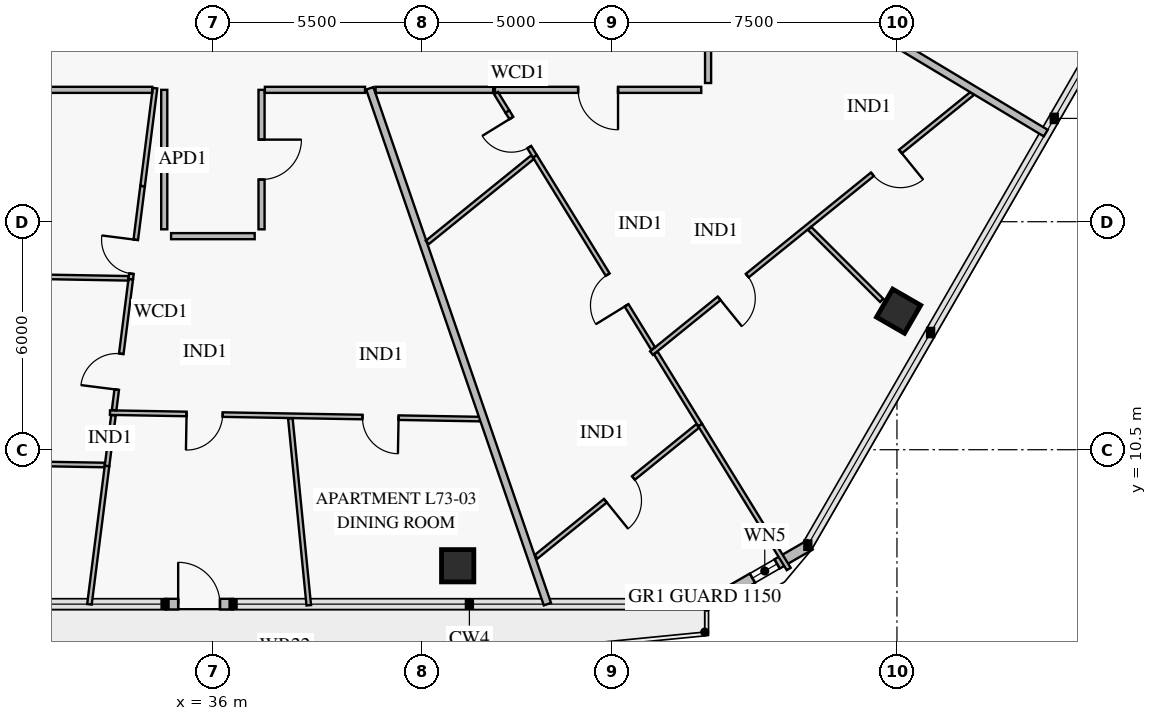
"""IFC4 building model, lengths in metres.
Left out: names, types, materials, properties, quantities, classifications, styles, units other than length and angle.
Written with IfcOpenShell. Run it as: python <this file> out.ifc"""

import sys

from ifc_helpers import new_model, si_unit, direction, frame, frame_2d, origin, origin_2d, place, context, subcontext, project, spatial, rectangle, extrude, element, fill, save


model = new_model("IFC4")
c1 = context("Model", 3, precision=1e-05, world=origin(), true_north=direction((0.0, 1.0)))
c2 = subcontext(c1, "Body", "Model", "MODEL_VIEW")
j1 = project(units=[si_unit("LENGTHUNIT", "METRE"), si_unit("PLANEANGLEUNIT", "RADIAN")], contexts=[c1])
p1 = place(None, origin())
s1 = spatial("IfcSite", under=j1, at=p1, CompositionType="ELEMENT")
p2 = place(p1, origin())
s2 = spatial("IfcBuilding", under=s1, at=p2, CompositionType="ELEMENT")
p3 = place(p2, frame((0.0, 0.0, 288.2)))
s3 = spatial("IfcBuildingStorey", under=s2, at=p3, CompositionType="ELEMENT", Elevation=288.2)
for number, where, z_axis, x_axis in (
    (1, (42.441, 7.446, 0.0), (0.0, 0.0, 1.0), (1.0, 0.0, 0.0)),
    (2, (54.044, 14.145, 0.0), (0.0, 0.0, 1.0), (0.5, 0.866, 0.0)),
):
    element("IfcColumn", number, at=place(p3, frame(where, z_axis=z_axis, x_axis=x_axis)), inside=s3, PredefinedType="COLUMN", context=c2, shape_type="SweptSolid", body=[
        extrude(rectangle(XDim=0.85, YDim=0.85, at=origin_2d()), origin(), (0.0, 0.0, 1.0), 3.55),
    ])
p4 = place(p3, frame((51.715, 7.996, 0.0), z_axis=(0.0, 0.0, 1.0), x_axis=(-0.866028773314, -0.499994163758, 0.0)))
e3 = element("IfcWall", 3, at=p4, inside=s3, PredefinedType="SOLIDWALL", context=c2, shape_type="SweptSolid", body=[
    extrude(rectangle(XDim=3.215, YDim=0.28, at=frame_2d((1.607, 0.0))), origin(), (0.0, 0.0, 1.0), 3.55),
])
p5 = place(p4, frame((1.003, 0.0, 0.85)))
e4 = element("IfcOpeningElement", 4, at=p5, cuts=e3, PredefinedType="OPENING", context=c2, shape_type="SweptSolid", body=[
    extrude(rectangle(XDim=0.75, YDim=1.5, at=frame_2d((0.375, 0.75))), frame((0.0, 0.152, 0.0), z_axis=(0.0, -1.0, 0.0), x_axis=(1.0, 0.0, 0.0)), (0.0, 0.0, 1.0), 0.304),
])
p6 = place(p3, frame((36.531, 6.436, 0.0), z_axis=(0.0, 0.0, 1.0), x_axis=(-1.0, 0.0, 0.0)))
e5 = element("IfcWall", 5, at=p6, inside=s3, PredefinedType="SOLIDWALL", context=c2, shape_type="SweptSolid", body=[
    extrude(rectangle(XDim=1.79, YDim=0.28, at=frame_2d((0.895, 0.0))), origin(), (0.0, 0.0, 1.0), 3.55),
])
p7 = place(p6, frame((0.345, 0.0, 0.0)))
e6 = element("IfcOpeningElement", 6, at=p7, cuts=e5, PredefinedType="OPENING", context=c2, shape_type="SweptSolid", body=[
    extrude(rectangle(XDim=1.1, YDim=2.2, at=frame_2d((0.55, 1.1))), frame((0.0, 0.152, 0.0), z_axis=(0.0, -1.0, 0.0), x_axis=(1.0, 0.0, 0.0)), (0.0, 0.0, 1.0), 0.304),
])
p8 = place(p3, frame((33.292, 11.476, 0.0), z_axis=(0.0, 0.0, 1.0), x_axis=(0.999847788191, -0.01744707568, 0.0)))
e7 = element("IfcWall", 7, at=p8, inside=s3, PredefinedType="PARTITIONING", context=c2, shape_type="SweptSolid", body=[
    extrude(rectangle(XDim=9.739, YDim=0.12, at=frame_2d((4.87, 0.0))), origin(), (0.0, 0.0, 1.0), 2.95),
])
p9 = place(p8, frame((2.016, 0.0, 0.0)))
e8 = element("IfcOpeningElement", 8, at=p9, cuts=e7, PredefinedType="OPENING", context=c2, shape_type="SweptSolid", body=[
    extrude(rectangle(XDim=0.95, YDim=2.1, at=frame_2d((0.475, 1.05))), frame((0.0, 0.072, 0.0), z_axis=(0.0, -1.0, 0.0), x_axis=(1.0, 0.0, 0.0)), (0.0, 0.0, 1.0), 0.144),
])
p10 = place(p8, frame((6.645, 0.0, 0.0)))
e9 = element("IfcOpeningElement", 9, at=p10, cuts=e7, PredefinedType="OPENING", context=c2, shape_type="SweptSolid", body=[
    extrude(rectangle(XDim=0.95, YDim=2.1, at=frame_2d((0.475, 1.05))), frame((0.0, 0.072, 0.0), z_axis=(0.0, -1.0, 0.0), x_axis=(1.0, 0.0, 0.0)), (0.0, 0.0, 1.0), 0.144),
])
p11 = place(p3, frame((34.15, 17.438, 0.0), z_axis=(0.0, 0.0, 1.0), x_axis=(-0.125966368588, -0.992034512497, 0.0)))
e10 = element("IfcWall", 10, at=p11, inside=s3, PredefinedType="PARTITIONING", context=c2, shape_type="SweptSolid", body=[
    extrude(rectangle(XDim=2.473, YDim=0.12, at=frame_2d((1.237, 0.0))), origin(), (0.0, 0.0, 1.0), 3.55),
])
p12 = place(p11, frame((1.425, 0.0, 0.0)))
e11 = element("IfcOpeningElement", 11, at=p12, cuts=e10, PredefinedType="OPENING", context=c2, shape_type="SweptSolid", body=[
    extrude(rectangle(XDim=0.9, YDim=2.1, at=frame_2d((0.45, 1.05))), frame((0.0, 0.072, 0.0), z_axis=(0.0, -1.0, 0.0), x_axis=(1.0, 0.0, 0.0)), (0.0, 0.0, 1.0), 0.144),
])
p13 = place(p3, frame((33.838, 14.984, 0.0), z_axis=(0.0, 0.0, 1.0), x_axis=(-0.126008805625, -0.992029123012, 0.0)))
e12 = element("IfcWall", 12, at=p13, inside=s3, PredefinedType="PARTITIONING", context=c2, shape_type="SweptSolid", body=[
    extrude(rectangle(XDim=3.47, YDim=0.12, at=frame_2d((1.735, 0.0))), origin(), (0.0, 0.0, 1.0), 3.15),
])
p14 = place(p13, frame((1.976, 0.0, 0.0)))
e13 = element("IfcOpeningElement", 13, at=p14, cuts=e12, PredefinedType="OPENING", context=c2, shape_type="SweptSolid", body=[
    extrude(rectangle(XDim=0.95, YDim=2.1, at=frame_2d((0.475, 1.05))), frame((0.0, 0.072, 0.0), z_axis=(0.0, -1.0, 0.0), x_axis=(1.0, 0.0, 0.0)), (0.0, 0.0, 1.0), 0.144),
])
p15 = place(p3, frame((33.384, 11.406, 0.0), z_axis=(0.0, 0.0, 1.0), x_axis=(-0.126066042506, -0.992021851033, 0.0)))
e14 = element("IfcWall", 14, at=p15, inside=s3, PredefinedType="PARTITIONING", context=c2, shape_type="SweptSolid", body=[
    extrude(rectangle(XDim=1.346, YDim=0.12, at=frame_2d((0.673, 0.0))), origin(), (0.0, 0.0, 1.0), 3.55),
])
p16 = place(p3, frame((27.74, 10.192, 0.0), z_axis=(0.0, 0.0, 1.0), x_axis=(0.999847499712, -0.017463599873, 0.0)))
e15 = element("IfcWall", 15, at=p16, inside=s3, PredefinedType="PARTITIONING", context=c2, shape_type="SweptSolid", body=[
    extrude(rectangle(XDim=5.41, YDim=0.12, at=frame_2d((2.705, 0.0))), origin(), (0.0, 0.0, 1.0), 2.95),
])
p17 = place(p16, frame((2.315, 0.0, 0.0)))
e16 = element("IfcOpeningElement", 16, at=p17, cuts=e15, PredefinedType="OPENING", context=c2, shape_type="SweptSolid", body=[
    extrude(rectangle(XDim=0.95, YDim=2.1, at=frame_2d((0.475, 1.05))), frame((0.0, 0.072, 0.0), z_axis=(0.0, -1.0, 0.0), x_axis=(1.0, 0.0, 0.0)), (0.0, 0.0, 1.0), 0.144),
])
p18 = place(p3, frame((37.28, 16.3, 0.0), z_axis=(0.0, 0.0, 1.0), x_axis=(0.0, 1.0, 0.0)))
e17 = element("IfcWall", 17, at=p18, inside=s3, PredefinedType="PARTITIONING", context=c2, shape_type="SweptSolid", body=[
    extrude(rectangle(XDim=3.67, YDim=0.16, at=frame_2d((1.835, 0.0))), origin(), (0.0, 0.0, 1.0), 3.55),
])
p19 = place(p18, frame((1.31, 0.0, 0.0)))
e18 = element("IfcOpeningElement", 18, at=p19, cuts=e17, PredefinedType="OPENING", context=c2, shape_type="SweptSolid", body=[
    extrude(rectangle(XDim=1.05, YDim=2.15, at=frame_2d((0.525, 1.075))), frame((0.0, 0.092, 0.0), z_axis=(0.0, -1.0, 0.0), x_axis=(1.0, 0.0, 0.0)), (0.0, 0.0, 1.0), 0.184),
])
p20 = place(p3, frame((47.542, 13.042, 0.0), z_axis=(0.0, 0.0, 1.0), x_axis=(0.777147459209, 0.629318541476, 0.0)))
e19 = element("IfcWall", 19, at=p20, inside=s3, PredefinedType="PARTITIONING", context=c2, shape_type="SweptSolid", body=[
    extrude(rectangle(XDim=10.857, YDim=0.12, at=frame_2d((5.428, 0.0))), origin(), (0.0, 0.0, 1.0), 2.95),
])
p21 = place(p20, frame((2.291, 0.0, 0.0)))
e20 = element("IfcOpeningElement", 20, at=p21, cuts=e19, PredefinedType="OPENING", context=c2, shape_type="SweptSolid", body=[
    extrude(rectangle(XDim=0.95, YDim=2.1, at=frame_2d((0.475, 1.05))), frame((0.0, 0.072, 0.0), z_axis=(0.0, -1.0, 0.0), x_axis=(1.0, 0.0, 0.0)), (0.0, 0.0, 1.0), 0.144),
])
p22 = place(p20, frame((7.479, 0.0, 0.0)))
e21 = element("IfcOpeningElement", 21, at=p22, cuts=e19, PredefinedType="OPENING", context=c2, shape_type="SweptSolid", body=[
    extrude(rectangle(XDim=0.95, YDim=2.1, at=frame_2d((0.475, 1.05))), frame((0.0, 0.072, 0.0), z_axis=(0.0, -1.0, 0.0), x_axis=(1.0, 0.0, 0.0)), (0.0, 0.0, 1.0), 0.144),
])
p23 = place(p3, frame((43.749, 19.4, 0.0), z_axis=(0.0, 0.0, 1.0), x_axis=(0.523959986515, -0.851742879355, 0.0)))
e22 = element("IfcWall", 22, at=p23, inside=s3, PredefinedType="PARTITIONING", context=c2, shape_type="SweptSolid", body=[
    extrude(rectangle(XDim=1.388, YDim=0.12, at=frame_2d((0.694, 0.0))), origin(), (0.0, 0.0, 1.0), 3.55),
])
p24 = place(p23, frame((0.2, 0.0, 0.0)))
e23 = element("IfcOpeningElement", 23, at=p24, cuts=e22, PredefinedType="OPENING", context=c2, shape_type="SweptSolid", body=[
    extrude(rectangle(XDim=0.9, YDim=2.1, at=frame_2d((0.45, 1.05))), frame((0.0, 0.072, 0.0), z_axis=(0.0, -1.0, 0.0), x_axis=(1.0, 0.0, 0.0)), (0.0, 0.0, 1.0), 0.144),
])
p25 = place(p3, frame((44.476, 18.218, 0.0), z_axis=(0.0, 0.0, 1.0), x_axis=(0.523831119105, -0.851822140272, 0.0)))
e24 = element("IfcWall", 24, at=p25, inside=s3, PredefinedType="PARTITIONING", context=c2, shape_type="SweptSolid", body=[
    extrude(rectangle(XDim=5.934, YDim=0.12, at=frame_2d((2.967, 0.0))), origin(), (0.0, 0.0, 1.0), 3.55),
])
p26 = place(p25, frame((3.65, 0.0, 0.0)))
e25 = element("IfcOpeningElement", 25, at=p26, cuts=e24, PredefinedType="OPENING", context=c2, shape_type="SweptSolid", body=[
    extrude(rectangle(XDim=0.95, YDim=2.1, at=frame_2d((0.475, 1.05))), frame((0.0, 0.072, 0.0), z_axis=(0.0, -1.0, 0.0), x_axis=(1.0, 0.0, 0.0)), (0.0, 0.0, 1.0), 0.144),
])
p27 = place(p3, frame((47.656, 13.046, 0.0), z_axis=(0.0, 0.0, 1.0), x_axis=(0.523853024062, -0.851808669351, 0.0)))
e26 = element("IfcWall", 26, at=p27, inside=s3, PredefinedType="PARTITIONING", context=c2, shape_type="SweptSolid", body=[
    extrude(rectangle(XDim=2.229, YDim=0.12, at=frame_2d((1.115, 0.0))), origin(), (0.0, 0.0, 1.0), 2.93),
])
p28 = place(p3, frame((44.505, 7.682, 0.0), z_axis=(0.0, 0.0, 1.0), x_axis=(0.777150298317, 0.629315035436, 0.0)))
e27 = element("IfcWall", 27, at=p28, inside=s3, PredefinedType="PARTITIONING", context=c2, shape_type="SweptSolid", body=[
    extrude(rectangle(XDim=5.471, YDim=0.12, at=frame_2d((2.736, 0.0))), origin(), (0.0, 0.0, 1.0), 2.93),
])
p29 = place(p28, frame((2.345, 0.0, 0.0)))
e28 = element("IfcOpeningElement", 28, at=p29, cuts=e27, PredefinedType="OPENING", context=c2, shape_type="SweptSolid", body=[
    extrude(rectangle(XDim=0.95, YDim=2.1, at=frame_2d((0.475, 1.05))), frame((0.0, 0.072, 0.0), z_axis=(0.0, -1.0, 0.0), x_axis=(1.0, 0.0, 0.0)), (0.0, 0.0, 1.0), 0.144),
])
p30 = place(p3, frame((43.421, 19.97, 0.0), z_axis=(0.0, 0.0, 1.0), x_axis=(1.0, 0.0, 0.0)))
e29 = element("IfcWall", 29, at=p30, inside=s3, PredefinedType="PARTITIONING", context=c2, shape_type="SweptSolid", body=[
    extrude(rectangle(XDim=5.429, YDim=0.16, at=frame_2d((2.714, 0.0))), origin(), (0.0, 0.0, 1.0), 2.95),
])
p31 = place(p30, frame((2.189, 0.0, 0.0)))
e30 = element("IfcOpeningElement", 30, at=p31, cuts=e29, PredefinedType="OPENING", context=c2, shape_type="SweptSolid", body=[
    extrude(rectangle(XDim=1.05, YDim=2.15, at=frame_2d((0.525, 1.075))), frame((0.0, 0.092, 0.0), z_axis=(0.0, -1.0, 0.0), x_axis=(1.0, 0.0, 0.0)), (0.0, 0.0, 1.0), 0.184),
])
p32 = place(p3, frame((38.038, 11.325, 0.0), z_axis=(0.0, 0.0, 1.0), x_axis=(0.098099997669, -0.995176562454, 0.0)))
e31 = element("IfcWall", 31, at=p32, inside=s3, PredefinedType="PARTITIONING", context=c2, shape_type="SweptSolid", body=[
    extrude(rectangle(XDim=4.943, YDim=0.12, at=frame_2d((2.471, 0.0))), origin(), (0.0, 0.0, 1.0), 2.93),
])
p33 = place(p3, frame((34.477, 20.015, 0.0), z_axis=(0.0, 0.0, 1.0), x_axis=(-0.126023918114, -0.992027203288, 0.0)))
e32 = element("IfcWall", 32, at=p33, inside=s3, PredefinedType="PARTITIONING", context=c2, shape_type="SweptSolid", body=[
    extrude(rectangle(XDim=2.598, YDim=0.12, at=frame_2d((1.299, 0.0))), origin(), (0.0, 0.0, 1.0), 3.55),
])
p34 = place(p3, frame((33.214, 10.071, 0.0), z_axis=(0.0, 0.0, 1.0), x_axis=(-0.126032826636, -0.992026071537, 0.0)))
e33 = element("IfcWall", 33, at=p34, inside=s3, PredefinedType="PARTITIONING", context=c2, shape_type="SweptSolid", body=[
    extrude(rectangle(XDim=3.669, YDim=0.12, at=frame_2d((1.834, 0.0))), origin(), (0.0, 0.0, 1.0), 2.93),
])
p35 = place(p3, frame((29.622, 15.083, 0.0), z_axis=(0.0, 0.0, 1.0), x_axis=(0.999847495958, -0.017463814767, 0.0)))
e34 = element("IfcWall", 34, at=p35, inside=s3, PredefinedType="PARTITIONING", context=c2, shape_type="SweptSolid", body=[
    extrude(rectangle(XDim=4.152, YDim=0.12, at=frame_2d((2.076, 0.0))), origin(), (0.0, 0.0, 1.0), 2.95),
])
p36 = place(p3, frame((40.128, 20.01, 0.0), z_axis=(0.0, 0.0, 1.0), x_axis=(0.325569269748, -0.945518191573, 0.0)))
e35 = element("IfcWall", 35, at=p36, inside=s3, PredefinedType="PARTITIONING", context=c2, shape_type="SweptSolid", body=[
    extrude(rectangle(XDim=14.356, YDim=0.2, at=frame_2d((7.178, 0.0))), origin(), (0.0, 0.0, 1.0), 2.93),
])
p37 = place(p3, frame((51.702, 16.323, 0.0), z_axis=(0.0, 0.0, 1.0), x_axis=(0.707607548717, -0.706605658765, 0.0)))
e36 = element("IfcWall", 36, at=p37, inside=s3, PredefinedType="PARTITIONING", context=c2, shape_type="SweptSolid", body=[
    extrude(rectangle(XDim=2.68, YDim=0.12, at=frame_2d((1.34, 0.0))), origin(), (0.0, 0.0, 1.0), 2.95),
])
p38 = place(p3, frame((43.452, 19.882, 0.0), z_axis=(0.0, 0.0, 1.0), x_axis=(0.52366415223, -0.851924794609, 0.0)))
e37 = element("IfcWall", 37, at=p38, inside=s3, PredefinedType="PARTITIONING", context=c2, shape_type="SweptSolid", body=[
    extrude(rectangle(XDim=0.566, YDim=0.12, at=frame_2d((0.283, 0.0))), origin(), (0.0, 0.0, 1.0), 3.55),
])
p39 = place(p3, frame((48.824, 11.147, 0.0), z_axis=(0.0, 0.0, 1.0), x_axis=(0.523827692324, -0.851824247574, 0.0)))
e38 = element("IfcWall", 38, at=p39, inside=s3, PredefinedType="PARTITIONING", context=c2, shape_type="SweptSolid", body=[
    extrude(rectangle(XDim=4.444, YDim=0.12, at=frame_2d((2.222, 0.0))), origin(), (0.0, 0.0, 1.0), 2.93),
])
p40 = place(p3, frame((41.639, 15.954, 0.0), z_axis=(0.0, 0.0, 1.0), x_axis=(0.777152329868, 0.629312526636, 0.0)))
e39 = element("IfcWall", 39, at=p40, inside=s3, PredefinedType="PARTITIONING", context=c2, shape_type="SweptSolid", body=[
    extrude(rectangle(XDim=3.564, YDim=0.12, at=frame_2d((1.782, 0.0))), origin(), (0.0, 0.0, 1.0), 3.55),
])
p41 = place(p3, frame((46.808, 25.506, 0.0), z_axis=(0.0, 0.0, 1.0), x_axis=(0.85716526059, -0.515041470212, 0.0)))
e40 = element("IfcWall", 40, at=p41, inside=s3, PredefinedType="PARTITIONING", context=c2, shape_type="SweptSolid", body=[
    extrude(rectangle(XDim=12.958, YDim=0.2, at=frame_2d((6.479, 0.0))), origin(), (0.0, 0.0, 1.0), 2.93),
])
p42 = place(p3, frame((34.72, 19.97, 0.0), z_axis=(0.0, 0.0, 1.0), x_axis=(0.0, -1.0, 0.0)))
e41 = element("IfcWall", 41, at=p42, inside=s3, PredefinedType="PARTITIONING", context=c2, shape_type="SweptSolid", body=[
    extrude(rectangle(XDim=3.67, YDim=0.16, at=frame_2d((1.835, 0.0))), origin(), (0.0, 0.0, 1.0), 3.55),
])
p43 = place(p3, frame((37.368, 19.97, 0.0), z_axis=(0.0, 0.0, 1.0), x_axis=(1.0, 0.0, 0.0)))
e42 = element("IfcWall", 42, at=p43, inside=s3, PredefinedType="PARTITIONING", context=c2, shape_type="SweptSolid", body=[
    extrude(rectangle(XDim=2.636, YDim=0.16, at=frame_2d((1.318, 0.0))), origin(), (0.0, 0.0, 1.0), 2.95),
])
p44 = place(p3, frame((34.9, 16.12, 0.0), z_axis=(0.0, 0.0, 1.0), x_axis=(1.0, 0.0, 0.0)))
e43 = element("IfcWall", 43, at=p44, inside=s3, PredefinedType="PARTITIONING", context=c2, shape_type="SweptSolid", body=[
    extrude(rectangle(XDim=2.2, YDim=0.16, at=frame_2d((1.1, 0.0))), origin(), (0.0, 0.0, 1.0), 3.55),
])
p45 = place(p3, frame((31.523, 19.97, 0.0), z_axis=(0.0, 0.0, 1.0), x_axis=(1.0, 0.0, 0.0)))
e44 = element("IfcWall", 44, at=p45, inside=s3, PredefinedType="PARTITIONING", context=c2, shape_type="SweptSolid", body=[
    extrude(rectangle(XDim=2.88, YDim=0.16, at=frame_2d((1.44, 0.0))), origin(), (0.0, 0.0, 1.0), 2.95),
])
p46 = place(p3, frame((49.03, 20.15, 0.0), z_axis=(0.0, 0.0, 1.0), x_axis=(0.0, 1.0, 0.0)))
e45 = element("IfcWall", 45, at=p46, inside=s3, PredefinedType="PARTITIONING", context=c2, shape_type="SweptSolid", body=[
    extrude(rectangle(XDim=2.05, YDim=0.16, at=frame_2d((1.025, 0.0))), origin(), (0.0, 0.0, 1.0), 3.55),
])
p47 = place(p3, frame((40.281, 19.97, 0.0), z_axis=(0.0, 0.0, 1.0), x_axis=(1.0, 0.0, 0.0)))
e46 = element("IfcWall", 46, at=p47, inside=s3, PredefinedType="PARTITIONING", context=c2, shape_type="SweptSolid", body=[
    extrude(rectangle(XDim=3.093, YDim=0.16, at=frame_2d((1.547, 0.0))), origin(), (0.0, 0.0, 1.0), 3.55),
])
p48 = place(p5, origin())
e47 = element("IfcWindow", 47, at=p48, inside=s3, PartitioningType="SINGLE_PANEL", PredefinedType="WINDOW", context=c2, shape_type="SweptSolid", body=[
    extrude(rectangle(XDim=0.75, YDim=1.5, at=frame_2d((0.375, 0.75))), frame((0.0, 0.03, 0.0), z_axis=(0.0, -1.0, 0.0), x_axis=(1.0, 0.0, 0.0)), (0.0, 0.0, 1.0), 0.06),
])
fill(e4, e47)
p49 = place(p7, frame((1.1, 0.0, 0.0), z_axis=(0.0, 0.0, 1.0), x_axis=(-1.0, 0.0, 0.0)))
e48 = element("IfcDoor", 48, at=p49, inside=s3, OperationType="SINGLE_SWING_LEFT", PredefinedType="DOOR", context=c2, shape_type="SweptSolid", body=[
    extrude(rectangle(XDim=1.1, YDim=2.2, at=frame_2d((0.55, 1.1))), frame((0.0, 0.025, 0.0), z_axis=(0.0, -1.0, 0.0), x_axis=(1.0, 0.0, 0.0)), (0.0, 0.0, 1.0), 0.05),
])
fill(e6, e48)
p50 = place(p9, frame((0.95, 0.0, 0.0), z_axis=(0.0, 0.0, 1.0), x_axis=(-1.0, 0.0, 0.0)))
e49 = element("IfcDoor", 49, at=p50, inside=s3, OperationType="SINGLE_SWING_RIGHT", PredefinedType="DOOR", context=c2, shape_type="SweptSolid", body=[
    extrude(rectangle(XDim=0.95, YDim=2.1, at=frame_2d((0.475, 1.05))), frame((0.0, 0.025, 0.0), z_axis=(0.0, -1.0, 0.0), x_axis=(1.0, 0.0, 0.0)), (0.0, 0.0, 1.0), 0.05),
])
fill(e8, e49)
p51 = place(p10, frame((0.95, 0.0, 0.0), z_axis=(0.0, 0.0, 1.0), x_axis=(-1.0, 0.0, 0.0)))
e50 = element("IfcDoor", 50, at=p51, inside=s3, OperationType="SINGLE_SWING_LEFT", PredefinedType="DOOR", context=c2, shape_type="SweptSolid", body=[
    extrude(rectangle(XDim=0.95, YDim=2.1, at=frame_2d((0.475, 1.05))), frame((0.0, 0.025, 0.0), z_axis=(0.0, -1.0, 0.0), x_axis=(1.0, 0.0, 0.0)), (0.0, 0.0, 1.0), 0.05),
])
fill(e9, e50)
p52 = place(p12, frame((0.9, 0.0, 0.0), z_axis=(0.0, 0.0, 1.0), x_axis=(-1.0, 0.0, 0.0)))
e51 = element("IfcDoor", 51, at=p52, inside=s3, OperationType="SINGLE_SWING_RIGHT", PredefinedType="DOOR", context=c2, shape_type="SweptSolid", body=[
    extrude(rectangle(XDim=0.9, YDim=2.1, at=frame_2d((0.45, 1.05))), frame((0.0, 0.025, 0.0), z_axis=(0.0, -1.0, 0.0), x_axis=(1.0, 0.0, 0.0)), (0.0, 0.0, 1.0), 0.05),
])
fill(e11, e51)
p53 = place(p14, frame((0.95, 0.0, 0.0), z_axis=(0.0, 0.0, 1.0), x_axis=(-1.0, 0.0, 0.0)))
e52 = element("IfcDoor", 52, at=p53, inside=s3, OperationType="SINGLE_SWING_LEFT", PredefinedType="DOOR", context=c2, shape_type="SweptSolid", body=[
    extrude(rectangle(XDim=0.95, YDim=2.1, at=frame_2d((0.475, 1.05))), frame((0.0, 0.025, 0.0), z_axis=(0.0, -1.0, 0.0), x_axis=(1.0, 0.0, 0.0)), (0.0, 0.0, 1.0), 0.05),
])
fill(e13, e52)
p54 = place(p19, frame((1.05, 0.0, 0.0), z_axis=(0.0, 0.0, 1.0), x_axis=(-1.0, 0.0, 0.0)))
e53 = element("IfcDoor", 53, at=p54, inside=s3, OperationType="SINGLE_SWING_LEFT", PredefinedType="DOOR", context=c2, shape_type="SweptSolid", body=[
    extrude(rectangle(XDim=1.05, YDim=2.15, at=frame_2d((0.525, 1.075))), frame((0.0, 0.025, 0.0), z_axis=(0.0, -1.0, 0.0), x_axis=(1.0, 0.0, 0.0)), (0.0, 0.0, 1.0), 0.05),
])
fill(e18, e53)
p55 = place(p21, frame((0.95, 0.0, 0.0), z_axis=(0.0, 0.0, 1.0), x_axis=(-1.0, 0.0, 0.0)))
e54 = element("IfcDoor", 54, at=p55, inside=s3, OperationType="SINGLE_SWING_RIGHT", PredefinedType="DOOR", context=c2, shape_type="SweptSolid", body=[
    extrude(rectangle(XDim=0.95, YDim=2.1, at=frame_2d((0.475, 1.05))), frame((0.0, 0.025, 0.0), z_axis=(0.0, -1.0, 0.0), x_axis=(1.0, 0.0, 0.0)), (0.0, 0.0, 1.0), 0.05),
])
fill(e20, e54)
p56 = place(p22, frame((0.95, 0.0, 0.0), z_axis=(0.0, 0.0, 1.0), x_axis=(-1.0, 0.0, 0.0)))
e55 = element("IfcDoor", 55, at=p56, inside=s3, OperationType="SINGLE_SWING_LEFT", PredefinedType="DOOR", context=c2, shape_type="SweptSolid", body=[
    extrude(rectangle(XDim=0.95, YDim=2.1, at=frame_2d((0.475, 1.05))), frame((0.0, 0.025, 0.0), z_axis=(0.0, -1.0, 0.0), x_axis=(1.0, 0.0, 0.0)), (0.0, 0.0, 1.0), 0.05),
])
fill(e21, e55)
p57 = place(p24, frame((0.9, 0.0, 0.0), z_axis=(0.0, 0.0, 1.0), x_axis=(-1.0, 0.0, 0.0)))
e56 = element("IfcDoor", 56, at=p57, inside=s3, OperationType="SINGLE_SWING_RIGHT", PredefinedType="DOOR", context=c2, shape_type="SweptSolid", body=[
    extrude(rectangle(XDim=0.9, YDim=2.1, at=frame_2d((0.45, 1.05))), frame((0.0, 0.025, 0.0), z_axis=(0.0, -1.0, 0.0), x_axis=(1.0, 0.0, 0.0)), (0.0, 0.0, 1.0), 0.05),
])
fill(e23, e56)
p58 = place(p26, frame((0.95, 0.0, 0.0), z_axis=(0.0, 0.0, 1.0), x_axis=(-1.0, 0.0, 0.0)))
e57 = element("IfcDoor", 57, at=p58, inside=s3, OperationType="SINGLE_SWING_LEFT", PredefinedType="DOOR", context=c2, shape_type="SweptSolid", body=[
    extrude(rectangle(XDim=0.95, YDim=2.1, at=frame_2d((0.475, 1.05))), frame((0.0, 0.025, 0.0), z_axis=(0.0, -1.0, 0.0), x_axis=(1.0, 0.0, 0.0)), (0.0, 0.0, 1.0), 0.05),
])
fill(e25, e57)
p59 = place(p29, frame((0.95, 0.0, 0.0), z_axis=(0.0, 0.0, 1.0), x_axis=(-1.0, 0.0, 0.0)))
e58 = element("IfcDoor", 58, at=p59, inside=s3, OperationType="SINGLE_SWING_RIGHT", PredefinedType="DOOR", context=c2, shape_type="SweptSolid", body=[
    extrude(rectangle(XDim=0.95, YDim=2.1, at=frame_2d((0.475, 1.05))), frame((0.0, 0.025, 0.0), z_axis=(0.0, -1.0, 0.0), x_axis=(1.0, 0.0, 0.0)), (0.0, 0.0, 1.0), 0.05),
])
fill(e28, e58)
p60 = place(p31, frame((1.05, 0.0, 0.0), z_axis=(0.0, 0.0, 1.0), x_axis=(-1.0, 0.0, 0.0)))
e59 = element("IfcDoor", 59, at=p60, inside=s3, OperationType="SINGLE_SWING_LEFT", PredefinedType="DOOR", context=c2, shape_type="SweptSolid", body=[
    extrude(rectangle(XDim=1.05, YDim=2.15, at=frame_2d((0.525, 1.075))), frame((0.0, 0.025, 0.0), z_axis=(0.0, -1.0, 0.0), x_axis=(1.0, 0.0, 0.0)), (0.0, 0.0, 1.0), 0.05),
])
fill(e30, e59)
save(model, sys.argv[1])
